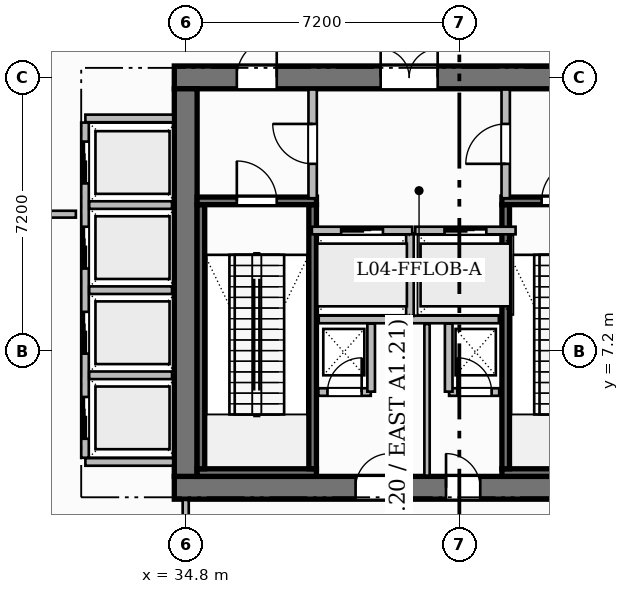
"""IFC4 building model, lengths in metres.
Left out: names, types, materials, properties, quantities, classifications, styles, units other than length and angle.
Written with IfcOpenShell. Run it as: python <this file> out.ifc"""

import sys

from ifc_helpers import new_model, si_unit, direction, frame, frame_2d, origin, place, context, subcontext, project, spatial, rectangle, extrude, source, transform, mapped, element, fill, save


model = new_model("IFC4")
c1 = context("Model", 3, precision=1e-05, world=origin(), true_north=direction((0.0, 1.0)))
c2 = subcontext(c1, "Body", "Model", "MODEL_VIEW")
j1 = project(units=[si_unit("LENGTHUNIT", "METRE"), si_unit("PLANEANGLEUNIT", "RADIAN")], contexts=[c1])
p1 = place(None, origin())
s1 = spatial("IfcSite", under=j1, at=p1, CompositionType="ELEMENT")
p2 = place(p1, origin())
s2 = spatial("IfcBuilding", under=s1, at=p2, CompositionType="ELEMENT")
p3 = place(p2, frame((0.0, 0.0, 21.6)))
s3 = spatial("IfcBuildingStorey", under=s2, at=p3, CompositionType="ELEMENT", Elevation=21.6)
p4 = place(p3, frame((34.5, 3.6, 0.0), z_axis=(0.0, 0.0, 1.0), x_axis=(1.0, 0.0, 0.0)))
e1 = element("IfcWall", 1, at=p4, inside=s3, PredefinedType="SHEAR", context=c2, shape_type="SweptSolid", body=[
    extrude(rectangle(XDim=15.6, YDim=0.6, at=frame_2d((7.8, 0.0))), origin(), (0.0, 0.0, 1.0), 5.4),
])
p5 = place(p4, frame((4.77, 0.0, 0.0)))
e2 = element("IfcOpeningElement", 2, at=p5, cuts=e1, PredefinedType="OPENING", context=c2, shape_type="SweptSolid", body=[
    extrude(rectangle(XDim=0.9, YDim=2.1, at=frame_2d((0.45, 1.05))), frame((0.0, 0.31, 0.0), z_axis=(0.0, -1.0, 0.0), x_axis=(1.0, 0.0, 0.0)), (0.0, 0.0, 1.0), 0.62),
])
p6 = place(p4, frame((7.15, 0.0, 0.0)))
e3 = element("IfcOpeningElement", 3, at=p6, cuts=e1, PredefinedType="OPENING", context=c2, shape_type="SweptSolid", body=[
    extrude(rectangle(XDim=0.9, YDim=2.1, at=frame_2d((0.45, 1.05))), frame((0.0, 0.31, 0.0), z_axis=(0.0, -1.0, 0.0), x_axis=(1.0, 0.0, 0.0)), (0.0, 0.0, 1.0), 0.62),
])
p7 = place(p3, frame((34.5, 14.4, 0.0), z_axis=(0.0, 0.0, 1.0), x_axis=(1.0, 0.0, 0.0)))
e4 = element("IfcWall", 4, at=p7, inside=s3, PredefinedType="SHEAR", context=c2, shape_type="SweptSolid", body=[
    extrude(rectangle(XDim=15.6, YDim=0.6, at=frame_2d((7.8, 0.0))), origin(), (0.0, 0.0, 1.0), 5.4),
])
p8 = place(p7, frame((5.43, 0.0, 0.0)))
e5 = element("IfcOpeningElement", 5, at=p8, cuts=e4, PredefinedType="OPENING", context=c2, shape_type="SweptSolid", body=[
    extrude(rectangle(XDim=1.5, YDim=2.2, at=frame_2d((0.75, 1.1))), frame((0.0, 0.31, 0.0), z_axis=(0.0, -1.0, 0.0), x_axis=(1.0, 0.0, 0.0)), (0.0, 0.0, 1.0), 0.62),
])
p9 = place(p7, frame((1.645, 0.0, 0.0)))
e6 = element("IfcOpeningElement", 6, at=p9, cuts=e4, PredefinedType="OPENING", context=c2, shape_type="SweptSolid", body=[
    extrude(rectangle(XDim=1.05, YDim=2.15, at=frame_2d((0.525, 1.075))), frame((0.0, 0.31, 0.0), z_axis=(0.0, -1.0, 0.0), x_axis=(1.0, 0.0, 0.0)), (0.0, 0.0, 1.0), 0.62),
])
p10 = place(p7, frame((11.275, 0.0, 0.0)))
e7 = element("IfcOpeningElement", 7, at=p10, cuts=e4, PredefinedType="OPENING", context=c2, shape_type="SweptSolid", body=[
    extrude(rectangle(XDim=1.05, YDim=2.15, at=frame_2d((0.525, 1.075))), frame((0.0, 0.31, 0.0), z_axis=(0.0, -1.0, 0.0), x_axis=(1.0, 0.0, 0.0)), (0.0, 0.0, 1.0), 0.62),
])
p11 = place(p3, frame((34.8, 3.9, 0.0), z_axis=(0.0, 0.0, 1.0), x_axis=(0.0, 1.0, 0.0)))
e8 = element("IfcWall", 8, at=p11, inside=s3, PredefinedType="SHEAR", context=c2, shape_type="SweptSolid", body=[
    extrude(rectangle(XDim=10.2, YDim=0.6, at=frame_2d((5.1, 0.0))), origin(), (0.0, 0.0, 1.0), 5.4),
])
p12 = place(p3, frame((35.1, 4.0, 0.0), z_axis=(0.0, 0.0, 1.0), x_axis=(1.0, 0.0, 0.0)))
e9 = element("IfcWall", 9, at=p12, inside=s3, PredefinedType="SHEAR", context=c2, shape_type="SweptSolid", body=[
    extrude(rectangle(XDim=3.14, YDim=0.2, at=frame_2d((1.57, 0.0))), origin(), (0.0, 0.0, 1.0), 5.4),
])
for number, where, z_axis, x_axis in (
    (10, (35.2, 4.1, 0.0), (0.0, 0.0, 1.0), (0.0, 1.0, 0.0)),
    (11, (38.14, 4.1, 0.0), (0.0, 0.0, 1.0), (0.0, 1.0, 0.0)),
):
    element("IfcWall", number, at=place(p3, frame(where, z_axis=z_axis, x_axis=x_axis)), inside=s3, PredefinedType="SHEAR", context=c2, shape_type="SweptSolid", body=[
        extrude(rectangle(XDim=6.95, YDim=0.2, at=frame_2d((3.475, 0.0))), origin(), (0.0, 0.0, 1.0), 5.4),
    ])
p13 = place(p3, frame((35.1, 11.15, 0.0), z_axis=(0.0, 0.0, 1.0), x_axis=(1.0, 0.0, 0.0)))
e12 = element("IfcWall", 12, at=p13, inside=s3, PredefinedType="SHEAR", context=c2, shape_type="SweptSolid", body=[
    extrude(rectangle(XDim=3.14, YDim=0.2, at=frame_2d((1.57, 0.0))), origin(), (0.0, 0.0, 1.0), 5.4),
])
p14 = place(p13, frame((1.045, 0.0, 0.0)))
e13 = element("IfcOpeningElement", 13, at=p14, cuts=e12, PredefinedType="OPENING", context=c2, shape_type="SweptSolid", body=[
    extrude(rectangle(XDim=1.05, YDim=2.2, at=frame_2d((0.525, 1.1))), frame((0.0, 0.11, 0.0), z_axis=(0.0, -1.0, 0.0), x_axis=(1.0, 0.0, 0.0)), (0.0, 0.0, 1.0), 0.22),
])
p15 = place(p3, frame((43.12, 4.0, 0.0), z_axis=(0.0, 0.0, 1.0), x_axis=(1.0, 0.0, 0.0)))
e14 = element("IfcWall", 14, at=p15, inside=s3, PredefinedType="SHEAR", context=c2, shape_type="SweptSolid", body=[
    extrude(rectangle(XDim=6.38, YDim=0.2, at=frame_2d((3.19, 0.0))), origin(), (0.0, 0.0, 1.0), 5.4),
])
p16 = place(p3, frame((43.22, 4.1, 0.0), z_axis=(0.0, 0.0, 1.0), x_axis=(0.0, 1.0, 0.0)))
e15 = element("IfcWall", 15, at=p16, inside=s3, PredefinedType="SHEAR", context=c2, shape_type="SweptSolid", body=[
    extrude(rectangle(XDim=6.95, YDim=0.2, at=frame_2d((3.475, 0.0))), origin(), (0.0, 0.0, 1.0), 5.4),
])
p17 = place(p3, frame((43.12, 11.15, 0.0), z_axis=(0.0, 0.0, 1.0), x_axis=(1.0, 0.0, 0.0)))
e16 = element("IfcWall", 16, at=p17, inside=s3, PredefinedType="SHEAR", context=c2, shape_type="SweptSolid", body=[
    extrude(rectangle(XDim=6.38, YDim=0.2, at=frame_2d((3.19, 0.0))), origin(), (0.0, 0.0, 1.0), 5.4),
])
p18 = place(p17, frame((1.045, 0.0, 0.0)))
e17 = element("IfcOpeningElement", 17, at=p18, cuts=e16, PredefinedType="OPENING", context=c2, shape_type="SweptSolid", body=[
    extrude(rectangle(XDim=1.05, YDim=2.2, at=frame_2d((0.525, 1.1))), frame((0.0, 0.11, 0.0), z_axis=(0.0, -1.0, 0.0), x_axis=(1.0, 0.0, 0.0)), (0.0, 0.0, 1.0), 0.22),
])
p19 = place(p17, frame((4.125, 0.0, 0.0)))
e18 = element("IfcOpeningElement", 18, at=p19, cuts=e16, PredefinedType="OPENING", context=c2, shape_type="SweptSolid", body=[
    extrude(rectangle(XDim=1.05, YDim=2.2, at=frame_2d((0.525, 1.1))), frame((0.0, 0.11, 0.0), z_axis=(0.0, -1.0, 0.0), x_axis=(1.0, 0.0, 0.0)), (0.0, 0.0, 1.0), 0.22),
])
p20 = place(p3, frame((38.3, 8.03, 0.0), z_axis=(0.0, 0.0, 1.0), x_axis=(1.0, 0.0, 0.0)))
e19 = element("IfcWall", 19, at=p20, inside=s3, PredefinedType="PARTITIONING", context=c2, shape_type="SweptSolid", body=[
    extrude(rectangle(XDim=4.74, YDim=0.2, at=frame_2d((2.37, 0.0))), origin(), (0.0, 0.0, 1.0), 5.1),
])
p21 = place(p3, frame((40.7, 8.12, 0.0), z_axis=(0.0, 0.0, 1.0), x_axis=(0.0, 1.0, 0.0)))
e20 = element("IfcWall", 20, at=p21, inside=s3, PredefinedType="PARTITIONING", context=c2, shape_type="SweptSolid", body=[
    extrude(rectangle(XDim=2.18, YDim=0.2, at=frame_2d((1.09, 0.0))), origin(), (0.0, 0.0, 1.0), 5.1),
])
p22 = place(p3, frame((38.14, 11.22, 0.0), z_axis=(0.0, 0.0, 1.0), x_axis=(0.0, 1.0, 0.0)))
e21 = element("IfcWall", 21, at=p22, inside=s3, PredefinedType="PARTITIONING", context=c2, shape_type="SweptSolid", body=[
    extrude(rectangle(XDim=2.86, YDim=0.22, at=frame_2d((1.43, 0.0))), origin(), (0.0, 0.0, 1.0), 5.1),
])
p23 = place(p22, frame((0.905, 0.0, 0.0)))
e22 = element("IfcOpeningElement", 22, at=p23, cuts=e21, PredefinedType="OPENING", context=c2, shape_type="SweptSolid", body=[
    extrude(rectangle(XDim=1.05, YDim=2.15, at=frame_2d((0.525, 1.075))), frame((0.0, 0.12, 0.0), z_axis=(0.0, -1.0, 0.0), x_axis=(1.0, 0.0, 0.0)), (0.0, 0.0, 1.0), 0.24),
])
p24 = place(p3, frame((43.22, 11.22, 0.0), z_axis=(0.0, 0.0, 1.0), x_axis=(0.0, 1.0, 0.0)))
e23 = element("IfcWall", 23, at=p24, inside=s3, PredefinedType="PARTITIONING", context=c2, shape_type="SweptSolid", body=[
    extrude(rectangle(XDim=2.86, YDim=0.22, at=frame_2d((1.43, 0.0))), origin(), (0.0, 0.0, 1.0), 5.1),
])
p25 = place(p24, frame((0.905, 0.0, 0.0)))
e24 = element("IfcOpeningElement", 24, at=p25, cuts=e23, PredefinedType="OPENING", context=c2, shape_type="SweptSolid", body=[
    extrude(rectangle(XDim=1.05, YDim=2.15, at=frame_2d((0.525, 1.075))), frame((0.0, 0.12, 0.0), z_axis=(0.0, -1.0, 0.0), x_axis=(1.0, 0.0, 0.0)), (0.0, 0.0, 1.0), 0.24),
])
p26 = place(p3, frame((38.29, 6.12, 0.0), z_axis=(0.0, 0.0, 1.0), x_axis=(1.0, 0.0, 0.0)))
e25 = element("IfcWall", 25, at=p26, inside=s3, PredefinedType="PARTITIONING", context=c2, shape_type="SweptSolid", body=[
    extrude(rectangle(XDim=1.38, YDim=0.2, at=frame_2d((0.69, 0.0))), origin(), (0.0, 0.0, 1.0), 5.1),
])
p27 = place(p26, frame((0.24, 0.0, 0.0)))
e26 = element("IfcOpeningElement", 26, at=p27, cuts=e25, PredefinedType="OPENING", context=c2, shape_type="SweptSolid", body=[
    extrude(rectangle(XDim=0.9, YDim=2.1, at=frame_2d((0.45, 1.05))), frame((0.0, 0.11, 0.0), z_axis=(0.0, -1.0, 0.0), x_axis=(1.0, 0.0, 0.0)), (0.0, 0.0, 1.0), 0.22),
])
p28 = place(p3, frame((39.68, 6.13, 0.0), z_axis=(0.0, 0.0, 1.0), x_axis=(0.0, 1.0, 0.0)))
e27 = element("IfcWall", 27, at=p28, inside=s3, PredefinedType="PARTITIONING", context=c2, shape_type="SweptSolid", body=[
    extrude(rectangle(XDim=1.79, YDim=0.2, at=frame_2d((0.895, 0.0))), origin(), (0.0, 0.0, 1.0), 5.1),
])
p29 = place(p3, frame((41.73, 6.12, 0.0), z_axis=(0.0, 0.0, 1.0), x_axis=(1.0, 0.0, 0.0)))
e28 = element("IfcWall", 28, at=p29, inside=s3, PredefinedType="PARTITIONING", context=c2, shape_type="SweptSolid", body=[
    extrude(rectangle(XDim=1.32, YDim=0.2, at=frame_2d((0.66, 0.0))), origin(), (0.0, 0.0, 1.0), 5.1),
])
p30 = place(p29, frame((0.22, 0.0, 0.0)))
e29 = element("IfcOpeningElement", 29, at=p30, cuts=e28, PredefinedType="OPENING", context=c2, shape_type="SweptSolid", body=[
    extrude(rectangle(XDim=0.9, YDim=2.1, at=frame_2d((0.45, 1.05))), frame((0.0, 0.11, 0.0), z_axis=(0.0, -1.0, 0.0), x_axis=(1.0, 0.0, 0.0)), (0.0, 0.0, 1.0), 0.22),
])
p31 = place(p3, frame((41.72, 6.13, 0.0), z_axis=(0.0, 0.0, 1.0), x_axis=(0.0, 1.0, 0.0)))
e30 = element("IfcWall", 30, at=p31, inside=s3, PredefinedType="PARTITIONING", context=c2, shape_type="SweptSolid", body=[
    extrude(rectangle(XDim=1.79, YDim=0.2, at=frame_2d((0.895, 0.0))), origin(), (0.0, 0.0, 1.0), 5.1),
])
p32 = place(p3, frame((41.15, 3.92, 0.0), z_axis=(0.0, 0.0, 1.0), x_axis=(0.0, 1.0, 0.0)))
e31 = element("IfcWall", 31, at=p32, inside=s3, PredefinedType="PARTITIONING", context=c2, shape_type="SweptSolid", body=[
    extrude(rectangle(XDim=3.99, YDim=0.14, at=frame_2d((1.995, 0.0))), origin(), (0.0, 0.0, 1.0), 5.1),
])
for number, where, z_axis, x_axis in (
    (32, (32.16, 4.28, 0.0), (0.0, 0.0, 1.0), (1.0, 0.0, 0.0)),
    (33, (32.16, 13.32, 0.0), (0.0, 0.0, 1.0), (1.0, 0.0, 0.0)),
):
    element("IfcWall", number, at=place(p3, frame(where, z_axis=z_axis, x_axis=x_axis)), inside=s3, PredefinedType="PARTITIONING", context=c2, shape_type="SweptSolid", body=[
        extrude(rectangle(XDim=2.31, YDim=0.2, at=frame_2d((1.155, 0.0))), origin(), (0.0, 0.0, 1.0), 5.1),
    ])
p33 = place(p3, frame((32.15, 4.39, 0.0), z_axis=(0.0, 0.0, 1.0), x_axis=(0.0, 1.0, 0.0)))
e34 = element("IfcWall", 34, at=p33, inside=s3, PredefinedType="PARTITIONING", context=c2, shape_type="SweptSolid", body=[
    extrude(rectangle(XDim=8.82, YDim=0.2, at=frame_2d((4.41, 0.0))), origin(), (0.0, 0.0, 1.0), 5.1),
])
p34 = place(p33, frame((0.5, 0.0, 0.0)))
e35 = element("IfcOpeningElement", 35, at=p34, cuts=e34, PredefinedType="OPENING", context=c2, shape_type="SweptSolid", body=[
    extrude(rectangle(XDim=1.1, YDim=2.2, at=frame_2d((0.55, 1.1))), frame((0.0, 0.11, 0.0), z_axis=(0.0, -1.0, 0.0), x_axis=(1.0, 0.0, 0.0)), (0.0, 0.0, 1.0), 0.22),
])
p35 = place(p33, frame((2.74, 0.0, 0.0)))
e36 = element("IfcOpeningElement", 36, at=p35, cuts=e34, PredefinedType="OPENING", context=c2, shape_type="SweptSolid", body=[
    extrude(rectangle(XDim=1.1, YDim=2.2, at=frame_2d((0.55, 1.1))), frame((0.0, 0.11, 0.0), z_axis=(0.0, -1.0, 0.0), x_axis=(1.0, 0.0, 0.0)), (0.0, 0.0, 1.0), 0.22),
])
p36 = place(p33, frame((4.98, 0.0, 0.0)))
e37 = element("IfcOpeningElement", 37, at=p36, cuts=e34, PredefinedType="OPENING", context=c2, shape_type="SweptSolid", body=[
    extrude(rectangle(XDim=1.1, YDim=2.2, at=frame_2d((0.55, 1.1))), frame((0.0, 0.11, 0.0), z_axis=(0.0, -1.0, 0.0), x_axis=(1.0, 0.0, 0.0)), (0.0, 0.0, 1.0), 0.22),
])
p37 = place(p33, frame((7.22, 0.0, 0.0)))
e38 = element("IfcOpeningElement", 38, at=p37, cuts=e34, PredefinedType="OPENING", context=c2, shape_type="SweptSolid", body=[
    extrude(rectangle(XDim=1.1, YDim=2.2, at=frame_2d((0.55, 1.1))), frame((0.0, 0.11, 0.0), z_axis=(0.0, -1.0, 0.0), x_axis=(1.0, 0.0, 0.0)), (0.0, 0.0, 1.0), 0.22),
])
for number, where, z_axis, x_axis in (
    (39, (32.26, 6.56, 0.0), (0.0, 0.0, 1.0), (1.0, 0.0, 0.0)),
    (40, (32.26, 8.8, 0.0), (0.0, 0.0, 1.0), (1.0, 0.0, 0.0)),
    (41, (32.26, 11.04, 0.0), (0.0, 0.0, 1.0), (1.0, 0.0, 0.0)),
):
    element("IfcWall", number, at=place(p3, frame(where, z_axis=z_axis, x_axis=x_axis)), inside=s3, PredefinedType="PARTITIONING", context=c2, shape_type="SweptSolid", body=[
        extrude(rectangle(XDim=2.18, YDim=0.2, at=frame_2d((1.09, 0.0))), origin(), (0.0, 0.0, 1.0), 5.1),
    ])
p38 = place(p3, frame((34.8, 0.32, 0.0), z_axis=(0.0, 0.0, 1.0), x_axis=(0.0, 1.0, 0.0)))
e42 = element("IfcWall", 42, at=p38, inside=s3, PredefinedType="PARTITIONING", context=c2, shape_type="SweptSolid", body=[
    extrude(rectangle(XDim=2.96, YDim=0.16, at=frame_2d((1.48, 0.0))), origin(), (0.0, 0.0, 1.0), 5.1),
])
p39 = place(p38, frame((0.955, 0.0, 0.0)))
e43 = element("IfcOpeningElement", 43, at=p39, cuts=e42, PredefinedType="OPENING", context=c2, shape_type="SweptSolid", body=[
    extrude(rectangle(XDim=1.05, YDim=2.15, at=frame_2d((0.525, 1.075))), frame((0.0, 0.09, 0.0), z_axis=(0.0, -1.0, 0.0), x_axis=(1.0, 0.0, 0.0)), (0.0, 0.0, 1.0), 0.18),
])
p40 = place(p3, frame((-4.632, 10.8, 0.0), z_axis=(0.0, 0.0, 1.0), x_axis=(1.0, 0.0, 0.0)))
e44 = element("IfcWall", 44, at=p40, inside=s3, PredefinedType="PARTITIONING", context=c2, shape_type="SweptSolid", body=[
    extrude(rectangle(XDim=36.542, YDim=0.18, at=frame_2d((18.271, 0.0))), origin(), (0.0, 0.0, 1.0), 5.1),
])
p41 = place(p40, frame((4.207, 0.0, 0.0)))
e45 = element("IfcOpeningElement", 45, at=p41, cuts=e44, PredefinedType="OPENING", context=c2, shape_type="SweptSolid", body=[
    extrude(rectangle(XDim=1.6, YDim=2.4, at=frame_2d((0.8, 1.2))), frame((0.0, 0.1, 0.0), z_axis=(0.0, -1.0, 0.0), x_axis=(1.0, 0.0, 0.0)), (0.0, 0.0, 1.0), 0.2),
])
p42 = place(p40, frame((16.032, 0.0, 0.0)))
e46 = element("IfcOpeningElement", 46, at=p42, cuts=e44, PredefinedType="OPENING", context=c2, shape_type="SweptSolid", body=[
    extrude(rectangle(XDim=1.6, YDim=2.4, at=frame_2d((0.8, 1.2))), frame((0.0, 0.1, 0.0), z_axis=(0.0, -1.0, 0.0), x_axis=(1.0, 0.0, 0.0)), (0.0, 0.0, 1.0), 0.2),
])
p43 = place(p40, frame((29.432, 0.0, 0.0)))
e47 = element("IfcOpeningElement", 47, at=p43, cuts=e44, PredefinedType="OPENING", context=c2, shape_type="SweptSolid", body=[
    extrude(rectangle(XDim=1.6, YDim=2.4, at=frame_2d((0.8, 1.2))), frame((0.0, 0.1, 0.0), z_axis=(0.0, -1.0, 0.0), x_axis=(1.0, 0.0, 0.0)), (0.0, 0.0, 1.0), 0.2),
])
p44 = place(p3, frame((38.12, 10.37, 0.0), z_axis=(0.0, 0.0, 1.0), x_axis=(1.0, 0.0, 0.0)))
e48 = element("IfcWall", 48, at=p44, inside=s3, PredefinedType="PARTITIONING", context=c2, shape_type="SweptSolid", body=[
    extrude(rectangle(XDim=2.64, YDim=0.2, at=frame_2d((1.32, 0.0))), origin(), (0.0, 0.0, 1.0), 5.1),
])
p45 = place(p44, frame((0.77, 0.0, 0.0)))
e49 = element("IfcOpeningElement", 49, at=p45, cuts=e48, PredefinedType="OPENING", context=c2, shape_type="SweptSolid", body=[
    extrude(rectangle(XDim=1.1, YDim=2.2, at=frame_2d((0.55, 1.1))), frame((0.0, 0.11, 0.0), z_axis=(0.0, -1.0, 0.0), x_axis=(1.0, 0.0, 0.0)), (0.0, 0.0, 1.0), 0.22),
])
p46 = place(p3, frame((40.84, 10.37, 0.0), z_axis=(0.0, 0.0, 1.0), x_axis=(1.0, 0.0, 0.0)))
e50 = element("IfcWall", 50, at=p46, inside=s3, PredefinedType="PARTITIONING", context=c2, shape_type="SweptSolid", body=[
    extrude(rectangle(XDim=2.64, YDim=0.2, at=frame_2d((1.32, 0.0))), origin(), (0.0, 0.0, 1.0), 5.1),
])
p47 = place(p46, frame((0.77, 0.0, 0.0)))
e51 = element("IfcOpeningElement", 51, at=p47, cuts=e50, PredefinedType="OPENING", context=c2, shape_type="SweptSolid", body=[
    extrude(rectangle(XDim=1.1, YDim=2.2, at=frame_2d((0.55, 1.1))), frame((0.0, 0.11, 0.0), z_axis=(0.0, -1.0, 0.0), x_axis=(1.0, 0.0, 0.0)), (0.0, 0.0, 1.0), 0.22),
])
m1 = source(origin(), c2, "Body", "SweptSolid", [
    extrude(rectangle(XDim=1.05, YDim=2.2, at=frame_2d((0.525, 1.1))), frame((0.0, 0.025, 0.0), z_axis=(0.0, -1.0, 0.0), x_axis=(1.0, 0.0, 0.0)), (0.0, 0.0, 1.0), 0.05),
])
p48 = place(p14, origin())
e52 = element("IfcDoor", 52, at=p48, inside=s3, OperationType="SINGLE_SWING_LEFT", PredefinedType="DOOR", context=c2, shape_type="MappedRepresentation", body=[
    mapped(m1, transform((0.0, 0.0, 0.0), scale=1.0)),
])
fill(e13, e52)
p49 = place(p18, origin())
e53 = element("IfcDoor", 53, at=p49, inside=s3, OperationType="SINGLE_SWING_RIGHT", PredefinedType="DOOR", context=c2, shape_type="MappedRepresentation", body=[
    mapped(m1, transform((0.0, 0.0, 0.0), scale=1.0)),
])
fill(e17, e53)
m2 = source(origin(), c2, "Body", "SweptSolid", [
    extrude(rectangle(XDim=1.05, YDim=2.15, at=frame_2d((0.525, 1.075))), frame((0.0, 0.025, 0.0), z_axis=(0.0, -1.0, 0.0), x_axis=(1.0, 0.0, 0.0)), (0.0, 0.0, 1.0), 0.05),
])
p50 = place(p23, origin())
e54 = element("IfcDoor", 54, at=p50, inside=s3, OperationType="SINGLE_SWING_RIGHT", PredefinedType="DOOR", context=c2, shape_type="MappedRepresentation", body=[
    mapped(m2, transform((0.0, 0.0, 0.0), scale=1.0)),
])
fill(e22, e54)
p51 = place(p25, origin())
e55 = element("IfcDoor", 55, at=p51, inside=s3, OperationType="SINGLE_SWING_LEFT", PredefinedType="DOOR", context=c2, shape_type="MappedRepresentation", body=[
    mapped(m2, transform((0.0, 0.0, 0.0), scale=1.0)),
])
fill(e24, e55)
m3 = source(origin(), c2, "Body", "SweptSolid", [
    extrude(rectangle(XDim=1.5, YDim=2.2, at=frame_2d((0.75, 1.1))), frame((0.0, 0.025, 0.0), z_axis=(0.0, -1.0, 0.0), x_axis=(1.0, 0.0, 0.0)), (0.0, 0.0, 1.0), 0.05),
])
p52 = place(p8, origin())
e56 = element("IfcDoor", 56, at=p52, inside=s3, OperationType="DOUBLE_DOOR_SINGLE_SWING", PredefinedType="DOOR", context=c2, shape_type="MappedRepresentation", body=[
    mapped(m3, transform((0.0, 0.0, 0.0), scale=1.0)),
])
fill(e5, e56)
p53 = place(p9, origin())
e57 = element("IfcDoor", 57, at=p53, inside=s3, OperationType="SINGLE_SWING_RIGHT", PredefinedType="DOOR", context=c2, shape_type="MappedRepresentation", body=[
    mapped(m2, transform((0.0, 0.0, 0.0), scale=1.0)),
])
fill(e6, e57)
m4 = source(origin(), c2, "Body", "SweptSolid", [
    extrude(rectangle(XDim=0.9, YDim=2.1, at=frame_2d((0.45, 1.05))), frame((0.0, 0.025, 0.0), z_axis=(0.0, -1.0, 0.0), x_axis=(1.0, 0.0, 0.0)), (0.0, 0.0, 1.0), 0.05),
])
p54 = place(p27, origin())
e58 = element("IfcDoor", 58, at=p54, inside=s3, OperationType="SINGLE_SWING_RIGHT", PredefinedType="DOOR", context=c2, shape_type="MappedRepresentation", body=[
    mapped(m4, transform((0.0, 0.0, 0.0), scale=1.0)),
])
fill(e26, e58)
p55 = place(p30, origin())
e59 = element("IfcDoor", 59, at=p55, inside=s3, OperationType="SINGLE_SWING_LEFT", PredefinedType="DOOR", context=c2, shape_type="MappedRepresentation", body=[
    mapped(m4, transform((0.0, 0.0, 0.0), scale=1.0)),
])
fill(e29, e59)
p56 = place(p5, origin())
e60 = element("IfcDoor", 60, at=p56, inside=s3, OperationType="SINGLE_SWING_RIGHT", PredefinedType="DOOR", context=c2, shape_type="MappedRepresentation", body=[
    mapped(m4, transform((0.0, 0.0, 0.0), scale=1.0)),
])
fill(e2, e60)
p57 = place(p6, origin())
e61 = element("IfcDoor", 61, at=p57, inside=s3, OperationType="SINGLE_SWING_LEFT", PredefinedType="DOOR", context=c2, shape_type="MappedRepresentation", body=[
    mapped(m4, transform((0.0, 0.0, 0.0), scale=1.0)),
])
fill(e3, e61)
m5 = source(origin(), c2, "Body", "SweptSolid", [
    extrude(rectangle(XDim=1.1, YDim=2.2, at=frame_2d((0.55, 1.1))), frame((0.0, 0.025, 0.0), z_axis=(0.0, -1.0, 0.0), x_axis=(1.0, 0.0, 0.0)), (0.0, 0.0, 1.0), 0.05),
])
p58 = place(p45, origin())
e62 = element("IfcDoor", 62, at=p58, inside=s3, OperationType="SLIDING_TO_LEFT", PredefinedType="DOOR", context=c2, shape_type="MappedRepresentation", body=[
    mapped(m5, transform((0.0, 0.0, 0.0), scale=1.0)),
])
fill(e49, e62)
p59 = place(p47, origin())
e63 = element("IfcDoor", 63, at=p59, inside=s3, OperationType="SLIDING_TO_LEFT", PredefinedType="DOOR", context=c2, shape_type="MappedRepresentation", body=[
    mapped(m5, transform((0.0, 0.0, 0.0), scale=1.0)),
])
fill(e51, e63)
p60 = place(p34, origin())
e64 = element("IfcDoor", 64, at=p60, inside=s3, OperationType="SLIDING_TO_LEFT", PredefinedType="DOOR", context=c2, shape_type="MappedRepresentation", body=[
    mapped(m5, transform((0.0, 0.0, 0.0), scale=1.0)),
])
fill(e35, e64)
p61 = place(p35, origin())
e65 = element("IfcDoor", 65, at=p61, inside=s3, OperationType="SLIDING_TO_LEFT", PredefinedType="DOOR", context=c2, shape_type="MappedRepresentation", body=[
    mapped(m5, transform((0.0, 0.0, 0.0), scale=1.0)),
])
fill(e36, e65)
p62 = place(p36, origin())
e66 = element("IfcDoor", 66, at=p62, inside=s3, OperationType="SLIDING_TO_LEFT", PredefinedType="DOOR", context=c2, shape_type="MappedRepresentation", body=[
    mapped(m5, transform((0.0, 0.0, 0.0), scale=1.0)),
])
fill(e37, e66)
p63 = place(p37, origin())
e67 = element("IfcDoor", 67, at=p63, inside=s3, OperationType="SLIDING_TO_LEFT", PredefinedType="DOOR", context=c2, shape_type="MappedRepresentation", body=[
    mapped(m5, transform((0.0, 0.0, 0.0), scale=1.0)),
])
fill(e38, e67)
save(model, sys.argv[1])
